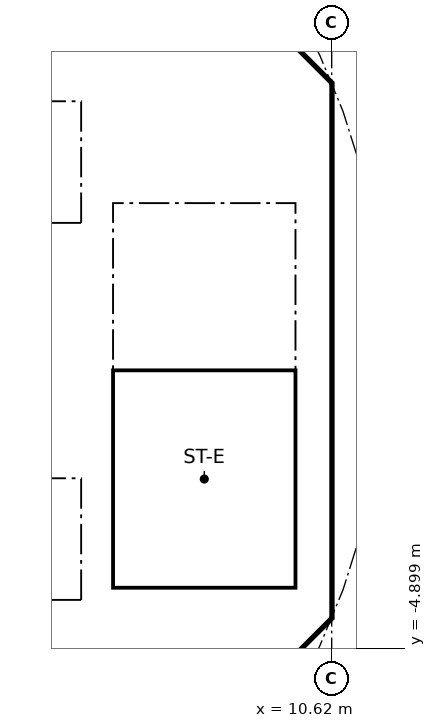
"""IFC4 building model, lengths in metres.
Left out: names, types, materials, properties, quantities, classifications, styles, units other than length and angle.
Written with IfcOpenShell. Run it as: python <this file> out.ifc"""

import sys

from ifc_helpers import new_model, si_unit, direction, frame, frame_2d, origin, place, context, subcontext, project, spatial, polyline, rectangle, outline, extrude, element, fill, save


model = new_model("IFC4")
c1 = context("Model", 3, precision=1e-05, world=origin(), true_north=direction((0.0, 1.0)))
c2 = subcontext(c1, "Body", "Model", "MODEL_VIEW")
j1 = project(units=[si_unit("LENGTHUNIT", "METRE"), si_unit("PLANEANGLEUNIT", "RADIAN")], contexts=[c1])
p1 = place(None, origin())
s1 = spatial("IfcSite", under=j1, at=p1, CompositionType="ELEMENT")
p2 = place(p1, origin())
s2 = spatial("IfcBuilding", under=s1, at=p2, CompositionType="ELEMENT")
p3 = place(p2, frame((0.0, 0.0, 77.0)))
s3 = spatial("IfcBuildingStorey", under=s2, at=p3, CompositionType="ELEMENT", Elevation=77.0)
p4 = place(p3, frame((9.988, 4.613, 0.0), z_axis=(0.0, 0.0, 1.0), x_axis=(-0.707106781187, 0.707106781187, 0.0)))
e1 = element("IfcWall", 1, at=p4, inside=s3, PredefinedType="SHEAR", context=c2, shape_type="SweptSolid", body=[
    extrude(rectangle(XDim=7.602, YDim=0.6, at=frame_2d((3.801, 0.0))), origin(), (0.0, 0.0, 1.0), 3.44),
])
p5 = place(p4, frame((3.201, 0.0, 0.0)))
e2 = element("IfcOpeningElement", 2, at=p5, cuts=e1, PredefinedType="OPENING", context=c2, shape_type="SweptSolid", body=[
    extrude(rectangle(XDim=1.2, YDim=2.1, at=frame_2d((0.6, 1.05))), frame((0.0, 0.31, 0.0), z_axis=(0.0, -1.0, 0.0), x_axis=(1.0, 0.0, 0.0)), (0.0, 0.0, 1.0), 0.62),
])
p6 = place(p3, frame((4.613, -9.988, 0.0), z_axis=(0.0, 0.0, 1.0), x_axis=(0.707106781187, 0.707106781187, 0.0)))
e3 = element("IfcWall", 3, at=p6, inside=s3, PredefinedType="SHEAR", context=c2, shape_type="SweptSolid", body=[
    extrude(rectangle(XDim=7.602, YDim=0.6, at=frame_2d((3.801, 0.0))), origin(), (0.0, 0.0, 1.0), 3.44),
])
p7 = place(p6, frame((3.201, 0.0, 0.0)))
e4 = element("IfcOpeningElement", 4, at=p7, cuts=e3, PredefinedType="OPENING", context=c2, shape_type="SweptSolid", body=[
    extrude(rectangle(XDim=1.2, YDim=2.1, at=frame_2d((0.6, 1.05))), frame((0.0, 0.31, 0.0), z_axis=(0.0, -1.0, 0.0), x_axis=(1.0, 0.0, 0.0)), (0.0, 0.0, 1.0), 0.62),
])
p8 = place(p3, frame((-6.7, 2.0, 0.0), z_axis=(0.0, 0.0, 1.0), x_axis=(1.0, 0.0, 0.0)))
e5 = element("IfcWall", 5, at=p8, inside=s3, PredefinedType="SOLIDWALL", context=c2, shape_type="SweptSolid", body=[
    extrude(rectangle(XDim=13.4, YDim=0.2, at=frame_2d((6.7, 0.0))), origin(), (0.0, 0.0, 1.0), 3.44),
])
p9 = place(p8, frame((0.65, 0.0, 0.0)))
e6 = element("IfcOpeningElement", 6, at=p9, cuts=e5, PredefinedType="OPENING", context=c2, shape_type="SweptSolid", body=[
    extrude(rectangle(XDim=1.1, YDim=2.1, at=frame_2d((0.55, 1.05))), frame((0.0, 0.11, 0.0), z_axis=(0.0, -1.0, 0.0), x_axis=(1.0, 0.0, 0.0)), (0.0, 0.0, 1.0), 0.22),
])
p10 = place(p8, frame((2.85, 0.0, 0.0)))
e7 = element("IfcOpeningElement", 7, at=p10, cuts=e5, PredefinedType="OPENING", context=c2, shape_type="SweptSolid", body=[
    extrude(rectangle(XDim=1.1, YDim=2.1, at=frame_2d((0.55, 1.05))), frame((0.0, 0.11, 0.0), z_axis=(0.0, -1.0, 0.0), x_axis=(1.0, 0.0, 0.0)), (0.0, 0.0, 1.0), 0.22),
])
p11 = place(p8, frame((5.05, 0.0, 0.0)))
e8 = element("IfcOpeningElement", 8, at=p11, cuts=e5, PredefinedType="OPENING", context=c2, shape_type="SweptSolid", body=[
    extrude(rectangle(XDim=1.1, YDim=2.1, at=frame_2d((0.55, 1.05))), frame((0.0, 0.11, 0.0), z_axis=(0.0, -1.0, 0.0), x_axis=(1.0, 0.0, 0.0)), (0.0, 0.0, 1.0), 0.22),
])
p12 = place(p3, frame((6.7, 4.0, 0.0), z_axis=(0.0, 0.0, 1.0), x_axis=(1.0, 0.0, 0.0)))
e9 = element("IfcWall", 9, at=p12, inside=s3, PredefinedType="SOLIDWALL", context=c2, shape_type="SweptSolid", body=[
    extrude(rectangle(XDim=3.325, YDim=0.2, at=frame_2d((1.662, 0.0))), origin(), (0.0, 0.0, 1.0), 3.44),
])
p13 = place(p12, frame((1.25, 0.0, 0.0)))
e10 = element("IfcOpeningElement", 10, at=p13, cuts=e9, PredefinedType="OPENING", context=c2, shape_type="SweptSolid", body=[
    extrude(rectangle(XDim=1.1, YDim=2.1, at=frame_2d((0.55, 1.05))), frame((0.0, 0.11, 0.0), z_axis=(0.0, -1.0, 0.0), x_axis=(1.0, 0.0, 0.0)), (0.0, 0.0, 1.0), 0.22),
])
p14 = place(p3, frame((-6.7, -2.0, 0.0), z_axis=(0.0, 0.0, 1.0), x_axis=(1.0, 0.0, 0.0)))
e11 = element("IfcWall", 11, at=p14, inside=s3, PredefinedType="SOLIDWALL", context=c2, shape_type="SweptSolid", body=[
    extrude(rectangle(XDim=13.4, YDim=0.2, at=frame_2d((6.7, 0.0))), origin(), (0.0, 0.0, 1.0), 3.44),
])
p15 = place(p14, frame((0.65, 0.0, 0.0)))
e12 = element("IfcOpeningElement", 12, at=p15, cuts=e11, PredefinedType="OPENING", context=c2, shape_type="SweptSolid", body=[
    extrude(rectangle(XDim=1.1, YDim=2.1, at=frame_2d((0.55, 1.05))), frame((0.0, 0.11, 0.0), z_axis=(0.0, -1.0, 0.0), x_axis=(1.0, 0.0, 0.0)), (0.0, 0.0, 1.0), 0.22),
])
p16 = place(p14, frame((2.85, 0.0, 0.0)))
e13 = element("IfcOpeningElement", 13, at=p16, cuts=e11, PredefinedType="OPENING", context=c2, shape_type="SweptSolid", body=[
    extrude(rectangle(XDim=1.1, YDim=2.1, at=frame_2d((0.55, 1.05))), frame((0.0, 0.11, 0.0), z_axis=(0.0, -1.0, 0.0), x_axis=(1.0, 0.0, 0.0)), (0.0, 0.0, 1.0), 0.22),
])
p17 = place(p3, origin())
e14 = element("IfcWall", 14, at=p17, inside=s3, PredefinedType="SHEAR", context=c2, shape_type="SweptSolid", body=[
    extrude(outline(polyline([(9.776, -4.401), (10.025, -4.152), (10.025, -3.801), (10.025, 4.152), (9.776, 4.401), (10.2, 4.825), (10.625, 4.401), (10.625, -4.401), (10.2, -4.825), (9.776, -4.401)])), origin(), (0.0, 0.0, 1.0), 3.44),
])
p18 = place(p3, origin())
e15 = element("IfcWall", 15, at=p18, inside=s3, PredefinedType="SOLIDWALL", context=c2, shape_type="SweptSolid", body=[
    extrude(outline(polyline([(-6.7, -2.1), (-6.5, -2.1), (-6.5, -4.1), (-4.5, -4.1), (-4.5, -2.1), (-4.3, -2.1), (-4.3, -4.1), (-2.3, -4.1), (-2.3, -2.1), (-2.1, -2.1), (-2.1, -4.1), (-0.1, -4.1), (-0.1, -2.1), (0.1, -2.1), (0.1, -4.1), (2.1, -4.1), (2.1, -2.1), (2.3, -2.1), (2.3, -4.1), (4.3, -4.1), (4.3, -2.1), (4.5, -2.1), (4.5, -4.1), (6.5, -4.1), (6.5, -2.1), (6.7, -2.1), (6.7, -4.3), (-6.7, -4.3), (-6.7, -2.1)])), origin(), (0.0, 0.0, 1.0), 3.44),
])
p19 = place(p3, origin())
e16 = element("IfcWall", 16, at=p19, inside=s3, PredefinedType="SOLIDWALL", context=c2, shape_type="SweptSolid", body=[
    extrude(outline(polyline([(-6.5, 2.1), (-6.7, 2.1), (-6.7, 4.3), (6.7, 4.3), (6.7, 2.1), (6.5, 2.1), (6.5, 4.1), (4.5, 4.1), (4.5, 2.1), (4.3, 2.1), (4.3, 4.1), (2.3, 4.1), (2.3, 2.1), (2.1, 2.1), (2.1, 4.1), (0.1, 4.1), (0.1, 2.1), (-0.1, 2.1), (-0.1, 4.1), (-2.1, 4.1), (-2.1, 2.1), (-2.3, 2.1), (-2.3, 4.1), (-4.3, 4.1), (-4.3, 2.1), (-4.5, 2.1), (-4.5, 4.1), (-6.5, 4.1), (-6.5, 2.1)])), origin(), (0.0, 0.0, 1.0), 3.44),
])
p20 = place(p3, origin())
e17 = element("IfcWall", 17, at=p20, inside=s3, PredefinedType="SOLIDWALL", context=c2, shape_type="SweptSolid", body=[
    extrude(outline(polyline([(7.025, -3.9), (6.7, -3.9), (6.7, 3.9), (7.025, 3.9), (7.025, -3.9)])), origin(), (0.0, 0.0, 1.0), 3.44),
])
p21 = place(p3, origin())
e18 = element("IfcWall", 18, at=p21, inside=s3, PredefinedType="SOLIDWALL", context=c2, shape_type="SweptSolid", body=[
    extrude(outline(polyline([(10.025, -4.1), (6.7, -4.1), (6.7, -3.9), (10.025, -3.9), (10.025, -4.1)])), origin(), (0.0, 0.0, 1.0), 3.44),
])
p22 = place(p13, frame((1.1, 0.0, 0.0), x_axis=(-1.0, 0.0, 0.0)))
e19 = element("IfcDoor", 19, at=p22, inside=s3, OperationType="SINGLE_SWING_LEFT", PredefinedType="DOOR", context=c2, shape_type="SweptSolid", body=[
    extrude(rectangle(XDim=1.1, YDim=2.1, at=frame_2d((0.55, 1.05))), frame((0.0, 0.025, 0.0), z_axis=(0.0, -1.0, 0.0), x_axis=(1.0, 0.0, 0.0)), (0.0, 0.0, 1.0), 0.05),
])
fill(e10, e19)
save(model, sys.argv[1])
